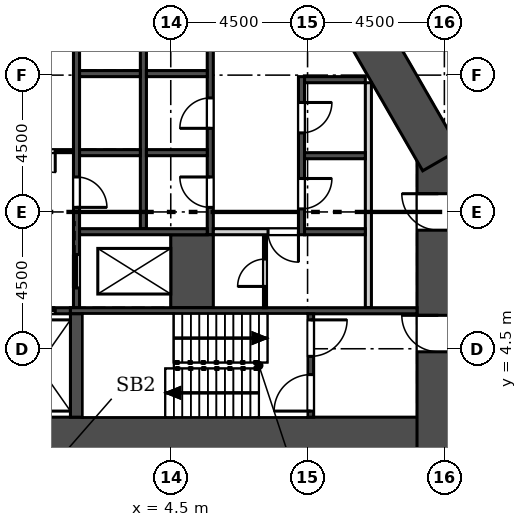
"""IFC4 building model, lengths in metres.
Left out: names, types, materials, properties, quantities, classifications, styles, units other than length and angle.
Written with IfcOpenShell. Run it as: python <this file> out.ifc"""

import sys

from ifc_helpers import new_model, si_unit, direction, frame, frame_2d, origin, place, context, subcontext, project, spatial, rectangle, extrude, element, fill, save


model = new_model("IFC4")
c1 = context("Model", 3, precision=1e-05, world=origin(), true_north=direction((0.0, 1.0)))
c2 = subcontext(c1, "Body", "Model", "MODEL_VIEW")
j1 = project(units=[si_unit("LENGTHUNIT", "METRE"), si_unit("PLANEANGLEUNIT", "RADIAN")], contexts=[c1])
p1 = place(None, origin())
s1 = spatial("IfcSite", under=j1, at=p1, CompositionType="ELEMENT")
p2 = place(p1, origin())
s2 = spatial("IfcBuilding", under=s1, at=p2, CompositionType="ELEMENT")
p3 = place(p2, frame((0.0, 0.0, 88.9)))
s3 = spatial("IfcBuildingStorey", under=s2, at=p3, CompositionType="ELEMENT", Elevation=88.9)
p4 = place(p3, frame((-14.0, 1.55, 0.0), z_axis=(0.0, 0.0, 1.0), x_axis=(1.0, 0.0, 0.0)))
e1 = element("IfcWall", 1, at=p4, inside=s3, PredefinedType="SHEAR", context=c2, shape_type="SweptSolid", body=[
    extrude(rectangle(XDim=28.0, YDim=1.4, at=frame_2d((14.0, 0.0))), origin(), (0.0, 0.0, 1.0), 7.2),
])
p5 = place(p3, frame((13.3, 0.85, 0.0), z_axis=(0.0, 0.0, 1.0), x_axis=(0.0, 1.0, 0.0)))
e2 = element("IfcWall", 2, at=p5, inside=s3, PredefinedType="SHEAR", context=c2, shape_type="SweptSolid", body=[
    extrude(rectangle(XDim=10.202, YDim=1.4, at=frame_2d((5.101, 0.0))), origin(), (0.0, 0.0, 1.0), 7.2),
])
p6 = place(p5, frame((3.55, 0.0, 0.0)))
e3 = element("IfcOpeningElement", 3, at=p6, cuts=e2, PredefinedType="OPENING", context=c2, shape_type="SweptSolid", body=[
    extrude(rectangle(XDim=1.2, YDim=2.1, at=frame_2d((0.6, 1.05))), frame((0.0, 0.71, 0.0), z_axis=(0.0, -1.0, 0.0), x_axis=(1.0, 0.0, 0.0)), (0.0, 0.0, 1.0), 1.42),
])
p7 = place(p5, frame((7.55, 0.0, 0.0)))
e4 = element("IfcOpeningElement", 4, at=p7, cuts=e2, PredefinedType="OPENING", context=c2, shape_type="SweptSolid", body=[
    extrude(rectangle(XDim=1.2, YDim=2.1, at=frame_2d((0.6, 1.05))), frame((0.0, 0.71, 0.0), z_axis=(0.0, -1.0, 0.0), x_axis=(1.0, 0.0, 0.0)), (0.0, 0.0, 1.0), 1.42),
])
p8 = place(p3, frame((13.394, 10.703, 0.0), z_axis=(0.0, 0.0, 1.0), x_axis=(-0.50000187635, 0.866024320471, 0.0)))
e5 = element("IfcWall", 5, at=p8, inside=s3, PredefinedType="SHEAR", context=c2, shape_type="SweptSolid", body=[
    extrude(rectangle(XDim=9.177, YDim=1.4, at=frame_2d((4.588, 0.0))), origin(), (0.0, 0.0, 1.0), 7.2),
])
p9 = place(p3, frame((30.863, 7.709, 0.0), z_axis=(0.0, 0.0, 1.0), x_axis=(-0.500000400847, 0.866025172355, 0.0)))
e6 = element("IfcWall", 6, at=p9, inside=s3, PredefinedType="SOLIDWALL", context=c2, shape_type="SweptSolid", body=[
    extrude(rectangle(XDim=53.021, YDim=0.34, at=frame_2d((26.51, 0.0))), origin(), (0.0, 0.0, 1.0), 6.8),
])
p10 = place(p9, frame((30.755, 0.0, 0.9)))
e7 = element("IfcOpeningElement", 7, at=p10, cuts=e6, PredefinedType="OPENING", context=c2, shape_type="SweptSolid", body=[
    extrude(rectangle(XDim=1.885, YDim=3.0, at=frame_2d((0.942, 1.5))), frame((0.0, 0.18, 0.0), z_axis=(0.0, -1.0, 0.0), x_axis=(1.0, 0.0, 0.0)), (0.0, 0.0, 1.0), 0.36),
])
p11 = place(p9, frame((36.755, 0.0, 0.9)))
e8 = element("IfcOpeningElement", 8, at=p11, cuts=e6, PredefinedType="OPENING", context=c2, shape_type="SweptSolid", body=[
    extrude(rectangle(XDim=1.885, YDim=3.0, at=frame_2d((0.942, 1.5))), frame((0.0, 0.18, 0.0), z_axis=(0.0, -1.0, 0.0), x_axis=(1.0, 0.0, 0.0)), (0.0, 0.0, 1.0), 0.36),
])
p12 = place(p9, frame((42.755, 0.0, 0.9)))
e9 = element("IfcOpeningElement", 9, at=p12, cuts=e6, PredefinedType="OPENING", context=c2, shape_type="SweptSolid", body=[
    extrude(rectangle(XDim=1.885, YDim=3.0, at=frame_2d((0.942, 1.5))), frame((0.0, 0.18, 0.0), z_axis=(0.0, -1.0, 0.0), x_axis=(1.0, 0.0, 0.0)), (0.0, 0.0, 1.0), 0.36),
])
p13 = place(p9, frame((48.755, 0.0, 0.9)))
e10 = element("IfcOpeningElement", 10, at=p13, cuts=e6, PredefinedType="OPENING", context=c2, shape_type="SweptSolid", body=[
    extrude(rectangle(XDim=1.885, YDim=3.0, at=frame_2d((0.942, 1.5))), frame((0.0, 0.18, 0.0), z_axis=(0.0, -1.0, 0.0), x_axis=(1.0, 0.0, 0.0)), (0.0, 0.0, 1.0), 0.36),
])
p14 = place(p3, frame((11.0, 5.85, 0.0), z_axis=(0.0, 0.0, 1.0), x_axis=(0.0, 1.0, 0.0)))
e11 = element("IfcWall", 11, at=p14, inside=s3, PredefinedType="SOLIDWALL", context=c2, shape_type="SweptSolid", body=[
    extrude(rectangle(XDim=7.4, YDim=0.2, at=frame_2d((3.7, 0.0))), origin(), (0.0, 0.0, 1.0), 6.8),
])
p15 = place(p3, frame((8.8, 8.25, -0.3), z_axis=(0.0, 0.0, 1.0), x_axis=(0.0, 1.0, 0.0)))
e12 = element("IfcWall", 12, at=p15, inside=s3, PredefinedType="SOLIDWALL", context=c2, shape_type="SweptSolid", body=[
    extrude(rectangle(XDim=5.2, YDim=0.2, at=frame_2d((2.6, 0.0))), origin(), (0.0, 0.0, 1.0), 7.1),
])
p16 = place(p15, frame((0.85, 0.0, 0.3)))
e13 = element("IfcOpeningElement", 13, at=p16, cuts=e12, PredefinedType="OPENING", context=c2, shape_type="SweptSolid", body=[
    extrude(rectangle(XDim=1.0, YDim=2.1, at=frame_2d((0.5, 1.05))), frame((0.0, 0.11, 0.0), z_axis=(0.0, -1.0, 0.0), x_axis=(1.0, 0.0, 0.0)), (0.0, 0.0, 1.0), 0.22),
])
p17 = place(p15, frame((3.35, 0.0, 0.3)))
e14 = element("IfcOpeningElement", 14, at=p17, cuts=e12, PredefinedType="OPENING", context=c2, shape_type="SweptSolid", body=[
    extrude(rectangle(XDim=1.0, YDim=2.1, at=frame_2d((0.5, 1.05))), frame((0.0, 0.11, 0.0), z_axis=(0.0, -1.0, 0.0), x_axis=(1.0, 0.0, 0.0)), (0.0, 0.0, 1.0), 0.22),
])
p18 = place(p3, frame((5.8, 8.25, -0.3), z_axis=(0.0, 0.0, 1.0), x_axis=(0.0, 1.0, 0.0)))
e15 = element("IfcWall", 15, at=p18, inside=s3, PredefinedType="SOLIDWALL", context=c2, shape_type="SweptSolid", body=[
    extrude(rectangle(XDim=8.0, YDim=0.2, at=frame_2d((4.0, 0.0))), origin(), (0.0, 0.0, 1.0), 7.1),
])
p19 = place(p18, frame((0.9, 0.0, 0.3)))
e16 = element("IfcOpeningElement", 16, at=p19, cuts=e15, PredefinedType="OPENING", context=c2, shape_type="SweptSolid", body=[
    extrude(rectangle(XDim=1.0, YDim=2.1, at=frame_2d((0.5, 1.05))), frame((0.0, 0.11, 0.0), z_axis=(0.0, -1.0, 0.0), x_axis=(1.0, 0.0, 0.0)), (0.0, 0.0, 1.0), 0.22),
])
p20 = place(p18, frame((3.5, 0.0, 0.3)))
e17 = element("IfcOpeningElement", 17, at=p20, cuts=e15, PredefinedType="OPENING", context=c2, shape_type="SweptSolid", body=[
    extrude(rectangle(XDim=1.0, YDim=2.1, at=frame_2d((0.5, 1.05))), frame((0.0, 0.11, 0.0), z_axis=(0.0, -1.0, 0.0), x_axis=(1.0, 0.0, 0.0)), (0.0, 0.0, 1.0), 0.22),
])
p21 = place(p18, frame((6.1, 0.0, 0.3)))
e18 = element("IfcOpeningElement", 18, at=p21, cuts=e15, PredefinedType="OPENING", context=c2, shape_type="SweptSolid", body=[
    extrude(rectangle(XDim=1.0, YDim=2.1, at=frame_2d((0.5, 1.05))), frame((0.0, 0.11, 0.0), z_axis=(0.0, -1.0, 0.0), x_axis=(1.0, 0.0, 0.0)), (0.0, 0.0, 1.0), 0.22),
])
p22 = place(p3, frame((3.6, 8.45, -0.3), z_axis=(0.0, 0.0, 1.0), x_axis=(0.0, 1.0, 0.0)))
e19 = element("IfcWall", 19, at=p22, inside=s3, PredefinedType="SOLIDWALL", context=c2, shape_type="SweptSolid", body=[
    extrude(rectangle(XDim=7.8, YDim=0.2, at=frame_2d((3.9, 0.0))), origin(), (0.0, 0.0, 1.0), 7.1),
])
p23 = place(p3, frame((1.4, 5.85, -0.3), z_axis=(0.0, 0.0, 1.0), x_axis=(0.0, 1.0, 0.0)))
e20 = element("IfcWall", 20, at=p23, inside=s3, PredefinedType="SOLIDWALL", context=c2, shape_type="SweptSolid", body=[
    extrude(rectangle(XDim=11.75, YDim=0.2, at=frame_2d((5.875, 0.0))), origin(), (0.0, 0.0, 1.0), 7.1),
])
p24 = place(p23, frame((0.65, 0.0, 0.3)))
e21 = element("IfcOpeningElement", 21, at=p24, cuts=e20, PredefinedType="OPENING", context=c2, shape_type="SweptSolid", body=[
    extrude(rectangle(XDim=1.1, YDim=2.1, at=frame_2d((0.55, 1.05))), frame((0.0, 0.11, 0.0), z_axis=(0.0, -1.0, 0.0), x_axis=(1.0, 0.0, 0.0)), (0.0, 0.0, 1.0), 0.22),
])
p25 = place(p23, frame((3.3, 0.0, 0.3)))
e22 = element("IfcOpeningElement", 22, at=p25, cuts=e20, PredefinedType="OPENING", context=c2, shape_type="SweptSolid", body=[
    extrude(rectangle(XDim=1.0, YDim=2.1, at=frame_2d((0.5, 1.05))), frame((0.0, 0.11, 0.0), z_axis=(0.0, -1.0, 0.0), x_axis=(1.0, 0.0, 0.0)), (0.0, 0.0, 1.0), 0.22),
])
p26 = place(p3, frame((5.2, 5.85, -0.3), z_axis=(0.0, 0.0, 1.0), x_axis=(0.0, 1.0, 0.0)))
e23 = element("IfcWall", 23, at=p26, inside=s3, PredefinedType="SOLIDWALL", context=c2, shape_type="SweptSolid", body=[
    extrude(rectangle(XDim=2.4, YDim=1.4, at=frame_2d((1.2, 0.0))), origin(), (0.0, 0.0, 1.0), 7.1),
])
p27 = place(p3, frame((8.9, 8.35, -0.3), z_axis=(0.0, 0.0, 1.0), x_axis=(1.0, 0.0, 0.0)))
e24 = element("IfcWall", 24, at=p27, inside=s3, PredefinedType="SOLIDWALL", context=c2, shape_type="SweptSolid", body=[
    extrude(rectangle(XDim=2.0, YDim=0.2, at=frame_2d((1.0, 0.0))), origin(), (0.0, 0.0, 1.0), 7.1),
])
p28 = place(p3, frame((1.5, 8.35, -0.3), z_axis=(0.0, 0.0, 1.0), x_axis=(1.0, 0.0, 0.0)))
e25 = element("IfcWall", 25, at=p28, inside=s3, PredefinedType="SOLIDWALL", context=c2, shape_type="SweptSolid", body=[
    extrude(rectangle(XDim=4.2, YDim=0.2, at=frame_2d((2.1, 0.0))), origin(), (0.0, 0.0, 1.0), 7.1),
])
p29 = place(p3, frame((-1.2, 5.75, -0.3), z_axis=(0.0, 0.0, 1.0), x_axis=(1.0, 0.0, 0.0)))
e26 = element("IfcWall", 26, at=p29, inside=s3, PredefinedType="SOLIDWALL", context=c2, shape_type="SweptSolid", body=[
    extrude(rectangle(XDim=2.4, YDim=0.2, at=frame_2d((1.2, 0.0))), origin(), (0.0, 0.0, 1.0), 7.1),
])
p30 = place(p29, frame((0.5, 0.0, 0.3)))
e27 = element("IfcOpeningElement", 27, at=p30, cuts=e26, PredefinedType="OPENING", context=c2, shape_type="SweptSolid", body=[
    extrude(rectangle(XDim=1.4, YDim=2.1, at=frame_2d((0.7, 1.05))), frame((0.0, 0.11, 0.0), z_axis=(0.0, -1.0, 0.0), x_axis=(1.0, 0.0, 0.0)), (0.0, 0.0, 1.0), 0.22),
])
p31 = place(p3, frame((1.2, 5.75, -0.3), z_axis=(0.0, 0.0, 1.0), x_axis=(1.0, 0.0, 0.0)))
e28 = element("IfcWall", 28, at=p31, inside=s3, PredefinedType="SOLIDWALL", context=c2, shape_type="SweptSolid", body=[
    extrude(rectangle(XDim=11.4, YDim=0.2, at=frame_2d((5.7, 0.0))), origin(), (0.0, 0.0, 1.0), 7.1),
])
p32 = place(p3, frame((9.1, 2.25, -0.3), z_axis=(0.0, 0.0, 1.0), x_axis=(0.0, 1.0, 0.0)))
e29 = element("IfcWall", 29, at=p32, inside=s3, PredefinedType="SOLIDWALL", context=c2, shape_type="SweptSolid", body=[
    extrude(rectangle(XDim=3.4, YDim=0.2, at=frame_2d((1.7, 0.0))), origin(), (0.0, 0.0, 1.0), 7.1),
])
p33 = place(p32, frame((0.2, 0.0, 0.3)))
e30 = element("IfcOpeningElement", 30, at=p33, cuts=e29, PredefinedType="OPENING", context=c2, shape_type="SweptSolid", body=[
    extrude(rectangle(XDim=1.2, YDim=2.1, at=frame_2d((0.6, 1.05))), frame((0.0, 0.11, 0.0), z_axis=(0.0, -1.0, 0.0), x_axis=(1.0, 0.0, 0.0)), (0.0, 0.0, 1.0), 0.22),
])
p34 = place(p32, frame((2.0, 0.0, 0.3)))
e31 = element("IfcOpeningElement", 31, at=p34, cuts=e29, PredefinedType="OPENING", context=c2, shape_type="SweptSolid", body=[
    extrude(rectangle(XDim=1.2, YDim=2.1, at=frame_2d((0.6, 1.05))), frame((0.0, 0.11, 0.0), z_axis=(0.0, -1.0, 0.0), x_axis=(1.0, 0.0, 0.0)), (0.0, 0.0, 1.0), 0.22),
])
p35 = place(p3, frame((1.4, 2.25, -0.3), z_axis=(0.0, 0.0, 1.0), x_axis=(0.0, 1.0, 0.0)))
e32 = element("IfcWall", 32, at=p35, inside=s3, PredefinedType="SOLIDWALL", context=c2, shape_type="SweptSolid", body=[
    extrude(rectangle(XDim=3.4, YDim=0.4, at=frame_2d((1.7, 0.0))), origin(), (0.0, 0.0, 1.0), 7.1),
])
for number, where, z_axis, x_axis in (
    (33, (8.9, 10.85, -0.3), (0.0, 0.0, 1.0), (1.0, 0.0, 0.0)),
    (34, (8.9, 13.35, -0.3), (0.0, 0.0, 1.0), (1.0, 0.0, 0.0)),
    (35, (3.7, 10.95, -0.3), (0.0, 0.0, 1.0), (1.0, 0.0, 0.0)),
    (36, (3.7, 13.55, -0.3), (0.0, 0.0, 1.0), (1.0, 0.0, 0.0)),
    (37, (1.5, 10.95, -0.3), (0.0, 0.0, 1.0), (1.0, 0.0, 0.0)),
    (38, (1.5, 13.55, -0.3), (0.0, 0.0, 1.0), (1.0, 0.0, 0.0)),
):
    element("IfcWall", number, at=place(p3, frame(where, z_axis=z_axis, x_axis=x_axis)), inside=s3, PredefinedType="SOLIDWALL", context=c2, shape_type="SweptSolid", body=[
        extrude(rectangle(XDim=2.0, YDim=0.2, at=frame_2d((1.0, 0.0))), origin(), (0.0, 0.0, 1.0), 7.1),
    ])
p36 = place(p3, frame((7.6, 5.85, 0.0), z_axis=(0.0, 0.0, 1.0), x_axis=(0.0, 1.0, 0.0)))
e39 = element("IfcWall", 39, at=p36, inside=s3, PredefinedType="PARTITIONING", context=c2, shape_type="SweptSolid", body=[
    extrude(rectangle(XDim=2.4, YDim=0.1, at=frame_2d((1.2, 0.0))), origin(), (0.0, 0.0, 1.0), 6.8),
])
p37 = place(p36, frame((0.7, 0.0, 0.0)))
e40 = element("IfcOpeningElement", 40, at=p37, cuts=e39, PredefinedType="OPENING", context=c2, shape_type="SweptSolid", body=[
    extrude(rectangle(XDim=0.9, YDim=2.1, at=frame_2d((0.45, 1.05))), frame((0.0, 0.06, 0.0), z_axis=(0.0, -1.0, 0.0), x_axis=(1.0, 0.0, 0.0)), (0.0, 0.0, 1.0), 0.12),
])
p38 = place(p3, frame((5.9, 8.35, 0.0), z_axis=(0.0, 0.0, 1.0), x_axis=(1.0, 0.0, 0.0)))
e41 = element("IfcWall", 41, at=p38, inside=s3, PredefinedType="SOLIDWALL", context=c2, shape_type="SweptSolid", body=[
    extrude(rectangle(XDim=2.8, YDim=0.2, at=frame_2d((1.4, 0.0))), origin(), (0.0, 0.0, 1.0), 6.8),
])
p39 = place(p38, frame((1.8, 0.0, 0.0)))
e42 = element("IfcOpeningElement", 42, at=p39, cuts=e41, PredefinedType="OPENING", context=c2, shape_type="SweptSolid", body=[
    extrude(rectangle(XDim=1.0, YDim=2.1, at=frame_2d((0.5, 1.05))), frame((0.0, 0.11, 0.0), z_axis=(0.0, -1.0, 0.0), x_axis=(1.0, 0.0, 0.0)), (0.0, 0.0, 1.0), 0.22),
])
p40 = place(p3, frame((-1.3, 11.0, 0.0), z_axis=(0.0, 0.0, 1.0), x_axis=(1.0, 0.0, 0.0)))
e43 = element("IfcWall", 43, at=p40, inside=s3, PredefinedType="PARTITIONING", context=c2, shape_type="SweptSolid", body=[
    extrude(rectangle(XDim=2.6, YDim=0.1, at=frame_2d((1.3, 0.0))), origin(), (0.0, 0.0, 1.0), 6.8),
])
p41 = place(p40, frame((0.6, 0.0, 0.0)))
e44 = element("IfcOpeningElement", 44, at=p41, cuts=e43, PredefinedType="OPENING", context=c2, shape_type="SweptSolid", body=[
    extrude(rectangle(XDim=1.4, YDim=2.1, at=frame_2d((0.7, 1.05))), frame((0.0, 0.06, 0.0), z_axis=(0.0, -1.0, 0.0), x_axis=(1.0, 0.0, 0.0)), (0.0, 0.0, 1.0), 0.12),
])
p42 = place(p3, frame((7.4, 3.95, 0.0), z_axis=(0.0, 0.0, 1.0), x_axis=(1.0, 0.0, 0.0)))
e45 = element("IfcWall", 45, at=p42, inside=s3, PredefinedType="SOLIDWALL", context=c2, shape_type="SweptSolid", body=[
    extrude(rectangle(XDim=1.6, YDim=0.2, at=frame_2d((0.8, 0.0))), origin(), (0.0, 0.0, 1.0), 6.8),
])
p43 = place(p24, origin())
e46 = element("IfcDoor", 46, at=p43, inside=s3, OperationType="SLIDING_TO_RIGHT", PredefinedType="DOOR", context=c2, shape_type="SweptSolid", body=[
    extrude(rectangle(XDim=1.1, YDim=2.1, at=frame_2d((0.55, 1.05))), frame((0.0, 0.025, 0.0), z_axis=(0.0, -1.0, 0.0), x_axis=(1.0, 0.0, 0.0)), (0.0, 0.0, 1.0), 0.05),
])
fill(e21, e46)
p44 = place(p30, origin())
e47 = element("IfcDoor", 47, at=p44, inside=s3, OperationType="SLIDING_TO_LEFT", PredefinedType="DOOR", context=c2, shape_type="SweptSolid", body=[
    extrude(rectangle(XDim=1.4, YDim=2.1, at=frame_2d((0.7, 1.05))), frame((0.0, 0.025, 0.0), z_axis=(0.0, -1.0, 0.0), x_axis=(1.0, 0.0, 0.0)), (0.0, 0.0, 1.0), 0.05),
])
fill(e27, e47)
p45 = place(p16, frame((1.0, 0.0, 0.0), z_axis=(0.0, 0.0, 1.0), x_axis=(-1.0, 0.0, 0.0)))
e48 = element("IfcDoor", 48, at=p45, inside=s3, OperationType="SINGLE_SWING_LEFT", PredefinedType="DOOR", context=c2, shape_type="SweptSolid", body=[
    extrude(rectangle(XDim=1.0, YDim=2.1, at=frame_2d((0.5, 1.05))), frame((0.0, 0.025, 0.0), z_axis=(0.0, -1.0, 0.0), x_axis=(1.0, 0.0, 0.0)), (0.0, 0.0, 1.0), 0.05),
])
fill(e13, e48)
p46 = place(p17, frame((1.0, 0.0, 0.0), z_axis=(0.0, 0.0, 1.0), x_axis=(-1.0, 0.0, 0.0)))
e49 = element("IfcDoor", 49, at=p46, inside=s3, OperationType="SINGLE_SWING_LEFT", PredefinedType="DOOR", context=c2, shape_type="SweptSolid", body=[
    extrude(rectangle(XDim=1.0, YDim=2.1, at=frame_2d((0.5, 1.05))), frame((0.0, 0.025, 0.0), z_axis=(0.0, -1.0, 0.0), x_axis=(1.0, 0.0, 0.0)), (0.0, 0.0, 1.0), 0.05),
])
fill(e14, e49)
p47 = place(p19, origin())
e50 = element("IfcDoor", 50, at=p47, inside=s3, OperationType="SINGLE_SWING_RIGHT", PredefinedType="DOOR", context=c2, shape_type="SweptSolid", body=[
    extrude(rectangle(XDim=1.0, YDim=2.1, at=frame_2d((0.5, 1.05))), frame((0.0, 0.025, 0.0), z_axis=(0.0, -1.0, 0.0), x_axis=(1.0, 0.0, 0.0)), (0.0, 0.0, 1.0), 0.05),
])
fill(e16, e50)
p48 = place(p20, origin())
e51 = element("IfcDoor", 51, at=p48, inside=s3, OperationType="SINGLE_SWING_LEFT", PredefinedType="DOOR", context=c2, shape_type="SweptSolid", body=[
    extrude(rectangle(XDim=1.0, YDim=2.1, at=frame_2d((0.5, 1.05))), frame((0.0, 0.025, 0.0), z_axis=(0.0, -1.0, 0.0), x_axis=(1.0, 0.0, 0.0)), (0.0, 0.0, 1.0), 0.05),
])
fill(e17, e51)
p49 = place(p25, frame((1.0, 0.0, 0.0), z_axis=(0.0, 0.0, 1.0), x_axis=(-1.0, 0.0, 0.0)))
e52 = element("IfcDoor", 52, at=p49, inside=s3, OperationType="SINGLE_SWING_RIGHT", PredefinedType="DOOR", context=c2, shape_type="SweptSolid", body=[
    extrude(rectangle(XDim=1.0, YDim=2.1, at=frame_2d((0.5, 1.05))), frame((0.0, 0.025, 0.0), z_axis=(0.0, -1.0, 0.0), x_axis=(1.0, 0.0, 0.0)), (0.0, 0.0, 1.0), 0.05),
])
fill(e22, e52)
p50 = place(p39, frame((1.0, 0.0, 0.0), z_axis=(0.0, 0.0, 1.0), x_axis=(-1.0, 0.0, 0.0)))
e53 = element("IfcDoor", 53, at=p50, inside=s3, OperationType="SINGLE_SWING_LEFT", PredefinedType="DOOR", context=c2, shape_type="SweptSolid", body=[
    extrude(rectangle(XDim=1.0, YDim=2.1, at=frame_2d((0.5, 1.05))), frame((0.0, 0.025, 0.0), z_axis=(0.0, -1.0, 0.0), x_axis=(1.0, 0.0, 0.0)), (0.0, 0.0, 1.0), 0.05),
])
fill(e42, e53)
p51 = place(p37, origin())
e54 = element("IfcDoor", 54, at=p51, inside=s3, OperationType="SINGLE_SWING_LEFT", PredefinedType="DOOR", context=c2, shape_type="SweptSolid", body=[
    extrude(rectangle(XDim=0.9, YDim=2.1, at=frame_2d((0.45, 1.05))), frame((0.0, 0.025, 0.0), z_axis=(0.0, -1.0, 0.0), x_axis=(1.0, 0.0, 0.0)), (0.0, 0.0, 1.0), 0.05),
])
fill(e40, e54)
p52 = place(p6, origin())
e55 = element("IfcDoor", 55, at=p52, inside=s3, OperationType="SINGLE_SWING_RIGHT", PredefinedType="DOOR", context=c2, shape_type="SweptSolid", body=[
    extrude(rectangle(XDim=1.2, YDim=2.1, at=frame_2d((0.6, 1.05))), frame((0.0, 0.025, 0.0), z_axis=(0.0, -1.0, 0.0), x_axis=(1.0, 0.0, 0.0)), (0.0, 0.0, 1.0), 0.05),
])
fill(e3, e55)
p53 = place(p33, origin())
e56 = element("IfcDoor", 56, at=p53, inside=s3, OperationType="SINGLE_SWING_LEFT", PredefinedType="DOOR", context=c2, shape_type="SweptSolid", body=[
    extrude(rectangle(XDim=1.2, YDim=2.1, at=frame_2d((0.6, 1.05))), frame((0.0, 0.025, 0.0), z_axis=(0.0, -1.0, 0.0), x_axis=(1.0, 0.0, 0.0)), (0.0, 0.0, 1.0), 0.05),
])
fill(e30, e56)
p54 = place(p7, origin())
e57 = element("IfcDoor", 57, at=p54, inside=s3, OperationType="SINGLE_SWING_RIGHT", PredefinedType="DOOR", context=c2, shape_type="SweptSolid", body=[
    extrude(rectangle(XDim=1.2, YDim=2.1, at=frame_2d((0.6, 1.05))), frame((0.0, 0.025, 0.0), z_axis=(0.0, -1.0, 0.0), x_axis=(1.0, 0.0, 0.0)), (0.0, 0.0, 1.0), 0.05),
])
fill(e4, e57)
p55 = place(p41, frame((1.4, 0.0, 0.0), z_axis=(0.0, 0.0, 1.0), x_axis=(-1.0, 0.0, 0.0)))
e58 = element("IfcDoor", 58, at=p55, inside=s3, OperationType="DOUBLE_DOOR_SINGLE_SWING", PredefinedType="DOOR", context=c2, shape_type="SweptSolid", body=[
    extrude(rectangle(XDim=1.4, YDim=2.1, at=frame_2d((0.7, 1.05))), frame((0.0, 0.025, 0.0), z_axis=(0.0, -1.0, 0.0), x_axis=(1.0, 0.0, 0.0)), (0.0, 0.0, 1.0), 0.05),
])
fill(e44, e58)
p56 = place(p34, frame((1.2, 0.0, 0.0), z_axis=(0.0, 0.0, 1.0), x_axis=(-1.0, 0.0, 0.0)))
e59 = element("IfcDoor", 59, at=p56, inside=s3, OperationType="SINGLE_SWING_LEFT", PredefinedType="DOOR", context=c2, shape_type="SweptSolid", body=[
    extrude(rectangle(XDim=1.2, YDim=2.1, at=frame_2d((0.6, 1.05))), frame((0.0, 0.025, 0.0), z_axis=(0.0, -1.0, 0.0), x_axis=(1.0, 0.0, 0.0)), (0.0, 0.0, 1.0), 0.05),
])
fill(e31, e59)
save(model, sys.argv[1])
